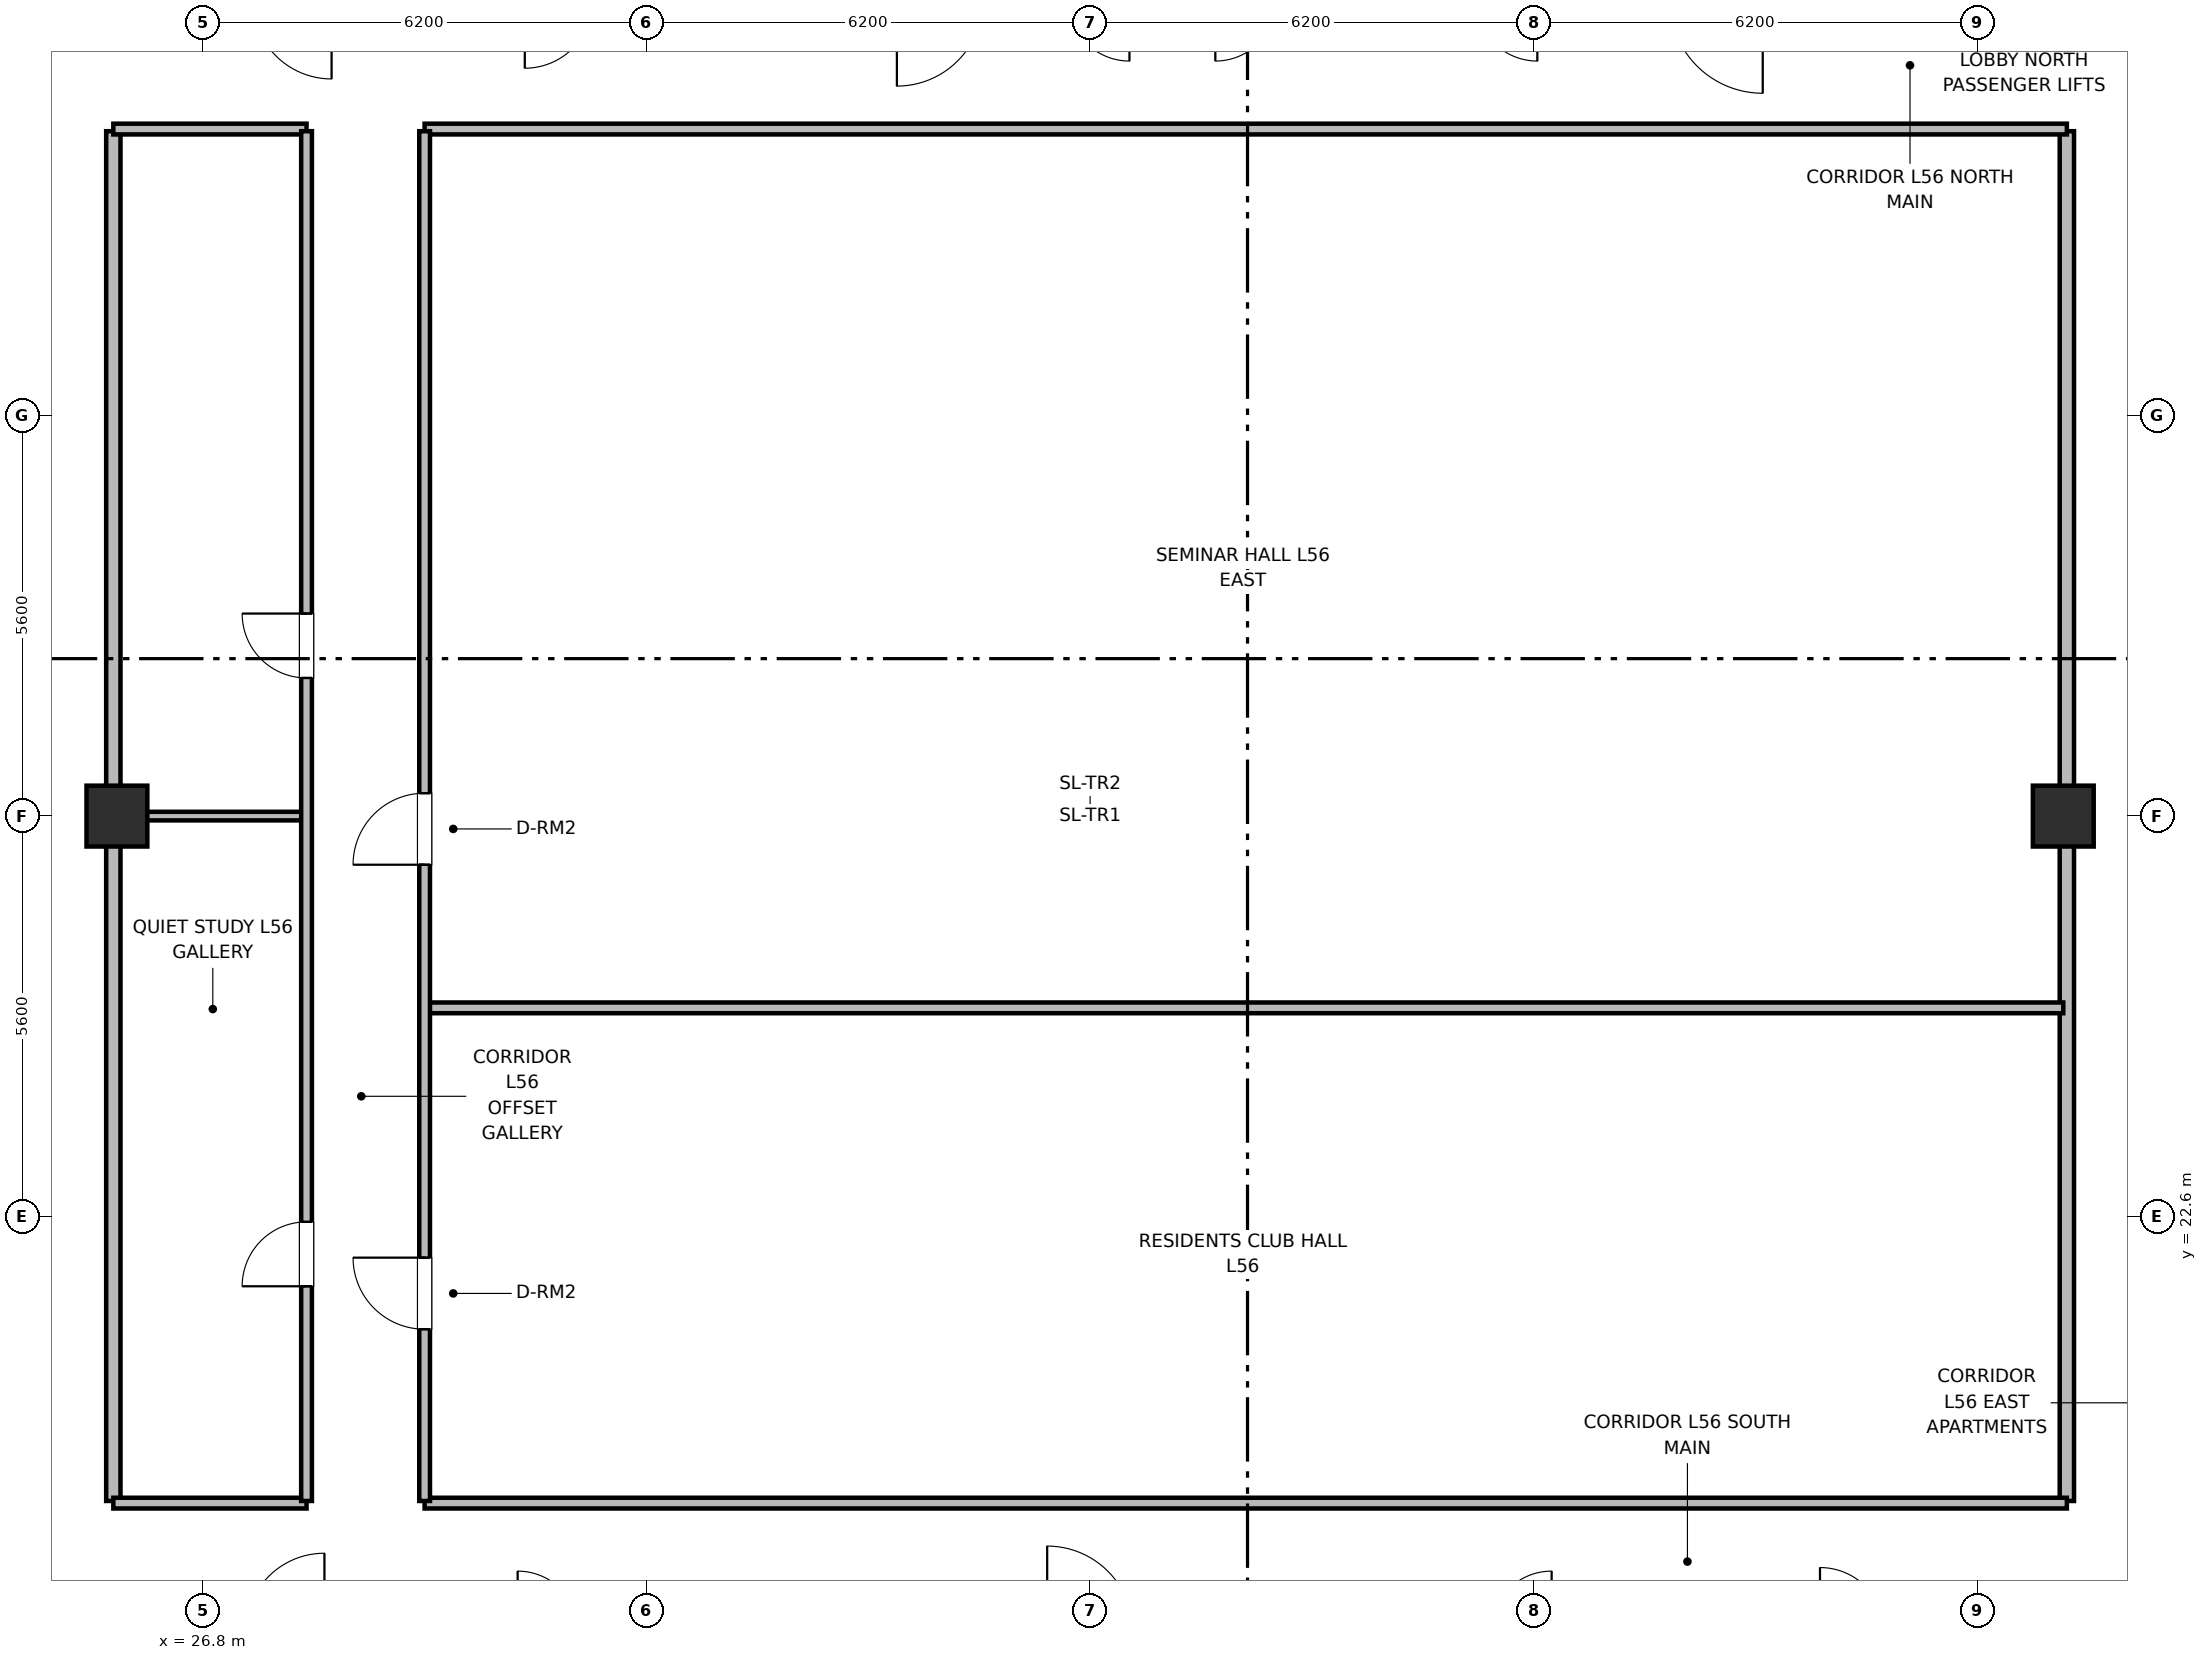
"""IFC4 building model, lengths in metres.
Left out: names, types, materials, properties, quantities, classifications, styles, units other than length and angle.
Written with IfcOpenShell. Run it as: python <this file> out.ifc"""

import sys

from ifc_helpers import new_model, si_unit, direction, frame, frame_2d, origin, origin_2d, place, context, subcontext, project, spatial, rectangle, extrude, element, fill, save


model = new_model("IFC4")
c1 = context("Model", 3, precision=1e-05, world=origin(), true_north=direction((0.0, 1.0)))
c2 = subcontext(c1, "Body", "Model", "MODEL_VIEW")
j1 = project(units=[si_unit("LENGTHUNIT", "METRE"), si_unit("PLANEANGLEUNIT", "RADIAN")], contexts=[c1])
p1 = place(None, origin())
s1 = spatial("IfcSite", under=j1, at=p1, CompositionType="ELEMENT")
p2 = place(p1, origin())
s2 = spatial("IfcBuilding", under=s1, at=p2, CompositionType="ELEMENT")
p3 = place(p2, frame((0.0, 0.0, 225.8)))
s3 = spatial("IfcBuildingStorey", under=s2, at=p3, CompositionType="ELEMENT", Elevation=225.8)
for number, where, z_axis, x_axis in (
    (1, (25.6, 28.2, 0.0), (0.0, 0.0, 1.0), (1.0, 0.0, 0.0)),
    (2, (52.8, 28.2, 0.0), (0.0, 0.0, 1.0), (1.0, 0.0, 0.0)),
):
    element("IfcColumn", number, at=place(p3, frame(where, z_axis=z_axis, x_axis=x_axis)), inside=s3, PredefinedType="COLUMN", context=c2, shape_type="SweptSolid", body=[
        extrude(rectangle(XDim=0.85, YDim=0.85, at=origin_2d()), origin(), (0.0, 0.0, 1.0), 3.7),
    ])
for number, where, z_axis, x_axis in (
    (3, (25.55, 18.63, 0.0), (0.0, 0.0, 1.0), (0.0, 1.0, 0.0)),
    (4, (52.85, 18.63, 0.0), (0.0, 0.0, 1.0), (0.0, 1.0, 0.0)),
):
    element("IfcWall", number, at=place(p3, frame(where, z_axis=z_axis, x_axis=x_axis)), inside=s3, PredefinedType="PARTITIONING", context=c2, shape_type="SweptSolid", body=[
        extrude(rectangle(XDim=19.14, YDim=0.2, at=frame_2d((9.57, 0.0))), origin(), (0.0, 0.0, 1.0), 2.56),
    ])
p4 = place(p3, frame((25.55, 18.6, 0.0), z_axis=(0.0, 0.0, 1.0), x_axis=(1.0, 0.0, 0.0)))
e5 = element("IfcWall", 5, at=p4, inside=s3, PredefinedType="PARTITIONING", context=c2, shape_type="SweptSolid", body=[
    extrude(rectangle(XDim=2.7, YDim=0.15, at=frame_2d((1.35, 0.0))), origin(), (0.0, 0.0, 1.0), 2.56),
])
p5 = place(p3, frame((29.9, 18.6, 0.0), z_axis=(0.0, 0.0, 1.0), x_axis=(1.0, 0.0, 0.0)))
e6 = element("IfcWall", 6, at=p5, inside=s3, PredefinedType="PARTITIONING", context=c2, shape_type="SweptSolid", body=[
    extrude(rectangle(XDim=22.95, YDim=0.15, at=frame_2d((11.475, 0.0))), origin(), (0.0, 0.0, 1.0), 2.56),
])
p6 = place(p3, frame((25.55, 37.8, 0.0), z_axis=(0.0, 0.0, 1.0), x_axis=(1.0, 0.0, 0.0)))
e7 = element("IfcWall", 7, at=p6, inside=s3, PredefinedType="PARTITIONING", context=c2, shape_type="SweptSolid", body=[
    extrude(rectangle(XDim=2.7, YDim=0.15, at=frame_2d((1.35, 0.0))), origin(), (0.0, 0.0, 1.0), 2.56),
])
p7 = place(p3, frame((29.9, 37.8, 0.0), z_axis=(0.0, 0.0, 1.0), x_axis=(1.0, 0.0, 0.0)))
e8 = element("IfcWall", 8, at=p7, inside=s3, PredefinedType="PARTITIONING", context=c2, shape_type="SweptSolid", body=[
    extrude(rectangle(XDim=22.95, YDim=0.15, at=frame_2d((11.475, 0.0))), origin(), (0.0, 0.0, 1.0), 2.56),
])
p8 = place(p3, frame((25.6, 28.2, 0.0), z_axis=(0.0, 0.0, 1.0), x_axis=(1.0, 0.0, 0.0)))
e9 = element("IfcWall", 9, at=p8, inside=s3, PredefinedType="PARTITIONING", context=c2, shape_type="SweptSolid", body=[
    extrude(rectangle(XDim=2.66, YDim=0.12, at=frame_2d((1.33, 0.0))), origin(), (0.0, 0.0, 1.0), 2.56),
])
p9 = place(p3, frame((29.93, 25.521, 0.0), z_axis=(0.0, 0.0, 1.0), x_axis=(1.0, 0.0, 0.0)))
e10 = element("IfcWall", 10, at=p9, inside=s3, PredefinedType="PARTITIONING", context=c2, shape_type="SweptSolid", body=[
    extrude(rectangle(XDim=22.87, YDim=0.15, at=frame_2d((11.435, 0.0))), origin(), (0.0, 0.0, 1.0), 2.56),
])
p10 = place(p3, frame((28.25, 18.63, 0.0), z_axis=(0.0, 0.0, 1.0), x_axis=(0.0, 1.0, 0.0)))
e11 = element("IfcWall", 11, at=p10, inside=s3, PredefinedType="PARTITIONING", context=c2, shape_type="SweptSolid", body=[
    extrude(rectangle(XDim=19.14, YDim=0.15, at=frame_2d((9.57, 0.0))), origin(), (0.0, 0.0, 1.0), 2.56),
])
p11 = place(p10, frame((3.0, 0.0, 0.0)))
e12 = element("IfcOpeningElement", 12, at=p11, cuts=e11, PredefinedType="OPENING", context=c2, shape_type="SweptSolid", body=[
    extrude(rectangle(XDim=0.9, YDim=2.1, at=frame_2d((0.45, 1.05))), frame((0.0, 0.085, 0.0), z_axis=(0.0, -1.0, 0.0), x_axis=(1.0, 0.0, 0.0)), (0.0, 0.0, 1.0), 0.17),
])
p12 = place(p10, frame((11.5, 0.0, 0.0)))
e13 = element("IfcOpeningElement", 13, at=p12, cuts=e11, PredefinedType="OPENING", context=c2, shape_type="SweptSolid", body=[
    extrude(rectangle(XDim=0.9, YDim=2.1, at=frame_2d((0.45, 1.05))), frame((0.0, 0.085, 0.0), z_axis=(0.0, -1.0, 0.0), x_axis=(1.0, 0.0, 0.0)), (0.0, 0.0, 1.0), 0.17),
])
p13 = place(p3, frame((29.9, 18.63, 0.0), z_axis=(0.0, 0.0, 1.0), x_axis=(0.0, 1.0, 0.0)))
e14 = element("IfcWall", 14, at=p13, inside=s3, PredefinedType="PARTITIONING", context=c2, shape_type="SweptSolid", body=[
    extrude(rectangle(XDim=19.14, YDim=0.15, at=frame_2d((9.57, 0.0))), origin(), (0.0, 0.0, 1.0), 2.56),
])
p14 = place(p13, frame((2.4, 0.0, 0.0)))
e15 = element("IfcOpeningElement", 15, at=p14, cuts=e14, PredefinedType="OPENING", context=c2, shape_type="SweptSolid", body=[
    extrude(rectangle(XDim=1.0, YDim=2.15, at=frame_2d((0.5, 1.075))), frame((0.0, 0.085, 0.0), z_axis=(0.0, -1.0, 0.0), x_axis=(1.0, 0.0, 0.0)), (0.0, 0.0, 1.0), 0.17),
])
p15 = place(p13, frame((8.89, 0.0, 0.0)))
e16 = element("IfcOpeningElement", 16, at=p15, cuts=e14, PredefinedType="OPENING", context=c2, shape_type="SweptSolid", body=[
    extrude(rectangle(XDim=1.0, YDim=2.15, at=frame_2d((0.5, 1.075))), frame((0.0, 0.085, 0.0), z_axis=(0.0, -1.0, 0.0), x_axis=(1.0, 0.0, 0.0)), (0.0, 0.0, 1.0), 0.17),
])
p16 = place(p11, origin())
e17 = element("IfcDoor", 17, at=p16, inside=s3, OperationType="SINGLE_SWING_LEFT", PredefinedType="DOOR", context=c2, shape_type="SweptSolid", body=[
    extrude(rectangle(XDim=0.9, YDim=2.1, at=frame_2d((0.45, 1.05))), frame((0.0, 0.025, 0.0), z_axis=(0.0, -1.0, 0.0), x_axis=(1.0, 0.0, 0.0)), (0.0, 0.0, 1.0), 0.05),
])
fill(e12, e17)
p17 = place(p12, origin())
e18 = element("IfcDoor", 18, at=p17, inside=s3, OperationType="SINGLE_SWING_RIGHT", PredefinedType="DOOR", context=c2, shape_type="SweptSolid", body=[
    extrude(rectangle(XDim=0.9, YDim=2.1, at=frame_2d((0.45, 1.05))), frame((0.0, 0.025, 0.0), z_axis=(0.0, -1.0, 0.0), x_axis=(1.0, 0.0, 0.0)), (0.0, 0.0, 1.0), 0.05),
])
fill(e13, e18)
p18 = place(p14, origin())
e19 = element("IfcDoor", 19, at=p18, inside=s3, OperationType="SINGLE_SWING_RIGHT", PredefinedType="DOOR", context=c2, shape_type="SweptSolid", body=[
    extrude(rectangle(XDim=1.0, YDim=2.15, at=frame_2d((0.5, 1.075))), frame((0.0, 0.025, 0.0), z_axis=(0.0, -1.0, 0.0), x_axis=(1.0, 0.0, 0.0)), (0.0, 0.0, 1.0), 0.05),
])
fill(e15, e19)
p19 = place(p15, origin())
e20 = element("IfcDoor", 20, at=p19, inside=s3, OperationType="SINGLE_SWING_LEFT", PredefinedType="DOOR", context=c2, shape_type="SweptSolid", body=[
    extrude(rectangle(XDim=1.0, YDim=2.15, at=frame_2d((0.5, 1.075))), frame((0.0, 0.025, 0.0), z_axis=(0.0, -1.0, 0.0), x_axis=(1.0, 0.0, 0.0)), (0.0, 0.0, 1.0), 0.05),
])
fill(e16, e20)
save(model, sys.argv[1])
